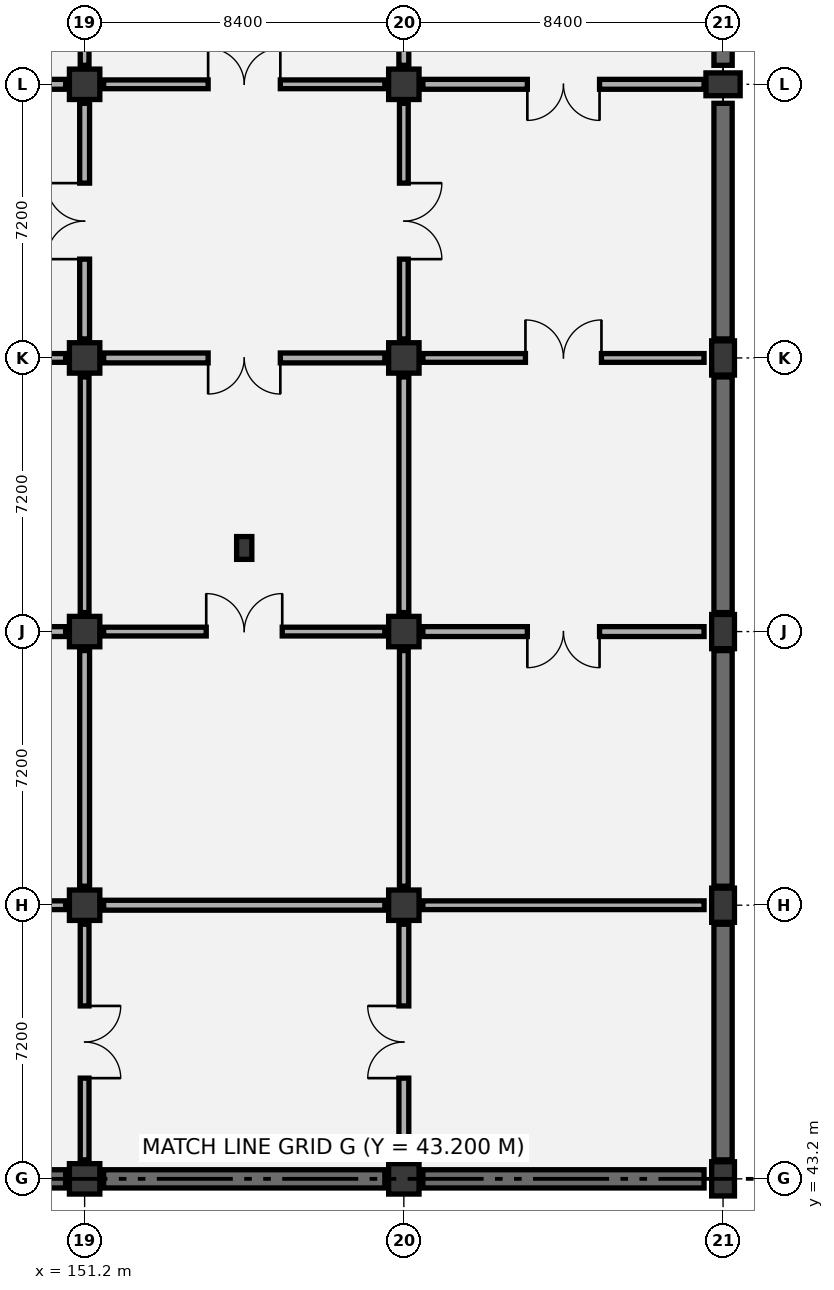
"""IFC4 building model, lengths in metres.
Left out: names, types, materials, properties, quantities, classifications, styles, units other than length and angle.
Written with IfcOpenShell. Run it as: python <this file> out.ifc"""

import sys

from ifc_helpers import new_model, si_unit, direction, frame, frame_2d, origin, origin_2d, place, context, subcontext, project, spatial, rectangle, extrude, element, fill, save


model = new_model("IFC4")
c1 = context("Model", 3, precision=1e-05, world=origin(), true_north=direction((0.0, 1.0)))
c2 = subcontext(c1, "Body", "Model", "MODEL_VIEW")
j1 = project(units=[si_unit("LENGTHUNIT", "METRE"), si_unit("PLANEANGLEUNIT", "RADIAN")], contexts=[c1])
p1 = place(None, origin())
s1 = spatial("IfcSite", under=j1, at=p1, CompositionType="ELEMENT")
p2 = place(p1, origin())
s2 = spatial("IfcBuilding", under=s1, at=p2, CompositionType="ELEMENT")
p3 = place(p2, frame((0.0, 0.0, -4.8)))
s3 = spatial("IfcBuildingStorey", under=s2, at=p3, CompositionType="ELEMENT", Elevation=-4.8)
for number, where, z_axis, x_axis in (
    (1, (151.2, 43.2, 0.0), (0.0, 0.0, 1.0), (1.0, 0.0, 0.0)),
    (2, (151.2, 50.4, 0.0), (0.0, 0.0, 1.0), (1.0, 0.0, 0.0)),
    (3, (151.2, 57.6, 0.0), (0.0, 0.0, 1.0), (1.0, 0.0, 0.0)),
    (4, (151.2, 64.8, 0.0), (0.0, 0.0, 1.0), (1.0, 0.0, 0.0)),
    (5, (151.2, 72.0, 0.0), (0.0, 0.0, 1.0), (1.0, 0.0, 0.0)),
    (6, (159.6, 43.2, 0.0), (0.0, 0.0, 1.0), (1.0, 0.0, 0.0)),
    (7, (159.6, 50.4, 0.0), (0.0, 0.0, 1.0), (1.0, 0.0, 0.0)),
    (8, (159.6, 57.6, 0.0), (0.0, 0.0, 1.0), (1.0, 0.0, 0.0)),
    (9, (159.6, 64.8, 0.0), (0.0, 0.0, 1.0), (1.0, 0.0, 0.0)),
    (10, (159.6, 72.0, 0.0), (0.0, 0.0, 1.0), (1.0, 0.0, 0.0)),
):
    element("IfcColumn", number, at=place(p3, frame(where, z_axis=z_axis, x_axis=x_axis)), inside=s3, PredefinedType="COLUMN", context=c2, shape_type="SweptSolid", body=[
        extrude(rectangle(XDim=0.8, YDim=0.8, at=origin_2d()), origin(), (0.0, 0.0, 1.0), 4.8),
    ])
for number, where, z_axis, x_axis in (
    (11, (168.0, 43.2, 0.0), (0.0, 0.0, 1.0), (1.0, 0.0, 0.0)),
    (12, (168.0, 50.4, 0.0), (0.0, 0.0, 1.0), (1.0, 0.0, 0.0)),
    (13, (168.0, 57.6, 0.0), (0.0, 0.0, 1.0), (1.0, 0.0, 0.0)),
    (14, (168.0, 64.8, 0.0), (0.0, 0.0, 1.0), (1.0, 0.0, 0.0)),
    (15, (168.0, 72.0, 0.0), (0.0, 0.0, 1.0), (0.0, 1.0, 0.0)),
):
    element("IfcColumn", number, at=place(p3, frame(where, z_axis=z_axis, x_axis=x_axis)), inside=s3, PredefinedType="COLUMN", context=c2, shape_type="SweptSolid", body=[
        extrude(rectangle(XDim=0.6, YDim=0.9, at=origin_2d()), origin(), (0.0, 0.0, 1.0), 4.8),
    ])
p4 = place(p3, frame((155.4, 59.8, 0.0), z_axis=(0.0, 0.0, 1.0), x_axis=(1.0, 0.0, 0.0)))
e16 = element("IfcColumn", 16, at=p4, inside=s3, PredefinedType="PILASTER", context=c2, shape_type="SweptSolid", body=[
    extrude(rectangle(XDim=0.4, YDim=0.6, at=origin_2d()), origin(), (0.0, 0.0, 1.0), 4.8),
])
p5 = place(p3, frame((143.3, 43.2, 0.0), z_axis=(0.0, 0.0, 1.0), x_axis=(1.0, 0.0, 0.0)))
e17 = element("IfcWall", 17, at=p5, inside=s3, PredefinedType="USERDEFINED", context=c2, shape_type="SweptSolid", body=[
    extrude(rectangle(XDim=7.4, YDim=0.48, at=frame_2d((3.7, 0.0))), origin(), (0.0, 0.0, 1.0), 4.45),
])
p6 = place(p3, frame((151.7, 43.2, 0.0), z_axis=(0.0, 0.0, 1.0), x_axis=(1.0, 0.0, 0.0)))
e18 = element("IfcWall", 18, at=p6, inside=s3, PredefinedType="USERDEFINED", context=c2, shape_type="SweptSolid", body=[
    extrude(rectangle(XDim=7.4, YDim=0.48, at=frame_2d((3.7, 0.0))), origin(), (0.0, 0.0, 1.0), 4.45),
])
p7 = place(p3, frame((160.1, 43.2, 0.0), z_axis=(0.0, 0.0, 1.0), x_axis=(1.0, 0.0, 0.0)))
e19 = element("IfcWall", 19, at=p7, inside=s3, PredefinedType="USERDEFINED", context=c2, shape_type="SweptSolid", body=[
    extrude(rectangle(XDim=7.4, YDim=0.48, at=frame_2d((3.7, 0.0))), origin(), (0.0, 0.0, 1.0), 4.575),
])
p8 = place(p3, frame((168.0, 43.7, 0.0), z_axis=(0.0, 0.0, 1.0), x_axis=(0.0, 1.0, 0.0)))
e20 = element("IfcWall", 20, at=p8, inside=s3, PredefinedType="USERDEFINED", context=c2, shape_type="SweptSolid", body=[
    extrude(rectangle(XDim=6.2, YDim=0.48, at=frame_2d((3.1, 0.0))), origin(), (0.0, 0.0, 1.0), 4.575),
])
p9 = place(p3, frame((168.0, 50.9, 0.0), z_axis=(0.0, 0.0, 1.0), x_axis=(0.0, 1.0, 0.0)))
e21 = element("IfcWall", 21, at=p9, inside=s3, PredefinedType="USERDEFINED", context=c2, shape_type="SweptSolid", body=[
    extrude(rectangle(XDim=6.2, YDim=0.48, at=frame_2d((3.1, 0.0))), origin(), (0.0, 0.0, 1.0), 4.575),
])
for number, where, z_axis, x_axis in (
    (22, (168.0, 58.1, 0.0), (0.0, 0.0, 1.0), (0.0, 1.0, 0.0)),
    (23, (168.0, 65.3, 0.0), (0.0, 0.0, 1.0), (0.0, 1.0, 0.0)),
    (24, (168.0, 72.5, 0.0), (0.0, 0.0, 1.0), (0.0, 1.0, 0.0)),
):
    element("IfcWall", number, at=place(p3, frame(where, z_axis=z_axis, x_axis=x_axis)), inside=s3, PredefinedType="USERDEFINED", context=c2, shape_type="SweptSolid", body=[
        extrude(rectangle(XDim=6.2, YDim=0.48, at=frame_2d((3.1, 0.0))), origin(), (0.0, 0.0, 1.0), 4.45),
    ])
p10 = place(p3, frame((151.2, 43.7, 0.0), z_axis=(0.0, 0.0, 1.0), x_axis=(0.0, 1.0, 0.0)))
e25 = element("IfcWall", 25, at=p10, inside=s3, PredefinedType="PARTITIONING", context=c2, shape_type="SweptSolid", body=[
    extrude(rectangle(XDim=6.2, YDim=0.23, at=frame_2d((3.1, 0.0))), origin(), (0.0, 0.0, 1.0), 3.645),
])
p11 = place(p10, frame((2.15, 0.0, 0.0)))
e26 = element("IfcOpeningElement", 26, at=p11, cuts=e25, PredefinedType="OPENING", context=c2, shape_type="SweptSolid", body=[
    extrude(rectangle(XDim=1.9, YDim=2.3, at=frame_2d((0.95, 1.15))), frame((0.0, 0.125, 0.0), z_axis=(0.0, -1.0, 0.0), x_axis=(1.0, 0.0, 0.0)), (0.0, 0.0, 1.0), 0.25),
])
p12 = place(p3, frame((143.3, 50.4, 0.0), z_axis=(0.0, 0.0, 1.0), x_axis=(1.0, 0.0, 0.0)))
e27 = element("IfcWall", 27, at=p12, inside=s3, PredefinedType="PARTITIONING", context=c2, shape_type="SweptSolid", body=[
    extrude(rectangle(XDim=7.4, YDim=0.23, at=frame_2d((3.7, 0.0))), origin(), (0.0, 0.0, 1.0), 3.545),
])
p13 = place(p3, frame((151.2, 50.9, 0.0), z_axis=(0.0, 0.0, 1.0), x_axis=(0.0, 1.0, 0.0)))
e28 = element("IfcWall", 28, at=p13, inside=s3, PredefinedType="PARTITIONING", context=c2, shape_type="SweptSolid", body=[
    extrude(rectangle(XDim=6.2, YDim=0.26, at=frame_2d((3.1, 0.0))), origin(), (0.0, 0.0, 1.0), 3.645),
])
p14 = place(p3, frame((143.3, 57.6, 0.0), z_axis=(0.0, 0.0, 1.0), x_axis=(1.0, 0.0, 0.0)))
e29 = element("IfcWall", 29, at=p14, inside=s3, PredefinedType="PARTITIONING", context=c2, shape_type="SweptSolid", body=[
    extrude(rectangle(XDim=7.4, YDim=0.26, at=frame_2d((3.7, 0.0))), origin(), (0.0, 0.0, 1.0), 3.545),
])
p15 = place(p14, frame((2.7, 0.0, 0.0)))
e30 = element("IfcOpeningElement", 30, at=p15, cuts=e29, PredefinedType="OPENING", context=c2, shape_type="SweptSolid", body=[
    extrude(rectangle(XDim=2.0, YDim=2.35, at=frame_2d((1.0, 1.175))), frame((0.0, 0.14, 0.0), z_axis=(0.0, -1.0, 0.0), x_axis=(1.0, 0.0, 0.0)), (0.0, 0.0, 1.0), 0.28),
])
p16 = place(p3, frame((151.2, 58.1, 0.0), z_axis=(0.0, 0.0, 1.0), x_axis=(0.0, 1.0, 0.0)))
e31 = element("IfcWall", 31, at=p16, inside=s3, PredefinedType="PARTITIONING", context=c2, shape_type="SweptSolid", body=[
    extrude(rectangle(XDim=6.2, YDim=0.23, at=frame_2d((3.1, 0.0))), origin(), (0.0, 0.0, 1.0), 3.645),
])
p17 = place(p3, frame((143.3, 64.8, 0.0), z_axis=(0.0, 0.0, 1.0), x_axis=(1.0, 0.0, 0.0)))
e32 = element("IfcWall", 32, at=p17, inside=s3, PredefinedType="PARTITIONING", context=c2, shape_type="SweptSolid", body=[
    extrude(rectangle(XDim=7.4, YDim=0.23, at=frame_2d((3.7, 0.0))), origin(), (0.0, 0.0, 1.0), 3.545),
])
p18 = place(p17, frame((2.75, 0.0, 0.0)))
e33 = element("IfcOpeningElement", 33, at=p18, cuts=e32, PredefinedType="OPENING", context=c2, shape_type="SweptSolid", body=[
    extrude(rectangle(XDim=1.9, YDim=2.3, at=frame_2d((0.95, 1.15))), frame((0.0, 0.125, 0.0), z_axis=(0.0, -1.0, 0.0), x_axis=(1.0, 0.0, 0.0)), (0.0, 0.0, 1.0), 0.25),
])
p19 = place(p3, frame((151.2, 65.3, 0.0), z_axis=(0.0, 0.0, 1.0), x_axis=(0.0, 1.0, 0.0)))
e34 = element("IfcWall", 34, at=p19, inside=s3, PredefinedType="PARTITIONING", context=c2, shape_type="SweptSolid", body=[
    extrude(rectangle(XDim=6.2, YDim=0.26, at=frame_2d((3.1, 0.0))), origin(), (0.0, 0.0, 1.0), 3.645),
])
p20 = place(p19, frame((2.1, 0.0, 0.0)))
e35 = element("IfcOpeningElement", 35, at=p20, cuts=e34, PredefinedType="OPENING", context=c2, shape_type="SweptSolid", body=[
    extrude(rectangle(XDim=2.0, YDim=2.35, at=frame_2d((1.0, 1.175))), frame((0.0, 0.14, 0.0), z_axis=(0.0, -1.0, 0.0), x_axis=(1.0, 0.0, 0.0)), (0.0, 0.0, 1.0), 0.28),
])
p21 = place(p3, frame((143.3, 72.0, 0.0), z_axis=(0.0, 0.0, 1.0), x_axis=(1.0, 0.0, 0.0)))
e36 = element("IfcWall", 36, at=p21, inside=s3, PredefinedType="PARTITIONING", context=c2, shape_type="SweptSolid", body=[
    extrude(rectangle(XDim=7.4, YDim=0.26, at=frame_2d((3.7, 0.0))), origin(), (0.0, 0.0, 1.0), 3.545),
])
p22 = place(p21, frame((2.75, 0.0, 0.0)))
e37 = element("IfcOpeningElement", 37, at=p22, cuts=e36, PredefinedType="OPENING", context=c2, shape_type="SweptSolid", body=[
    extrude(rectangle(XDim=1.9, YDim=2.3, at=frame_2d((0.95, 1.15))), frame((0.0, 0.14, 0.0), z_axis=(0.0, -1.0, 0.0), x_axis=(1.0, 0.0, 0.0)), (0.0, 0.0, 1.0), 0.28),
])
p23 = place(p3, frame((151.2, 72.5, 0.0), z_axis=(0.0, 0.0, 1.0), x_axis=(0.0, 1.0, 0.0)))
e38 = element("IfcWall", 38, at=p23, inside=s3, PredefinedType="PARTITIONING", context=c2, shape_type="SweptSolid", body=[
    extrude(rectangle(XDim=6.2, YDim=0.23, at=frame_2d((3.1, 0.0))), origin(), (0.0, 0.0, 1.0), 3.645),
])
p24 = place(p3, frame((159.6, 43.7, 0.0), z_axis=(0.0, 0.0, 1.0), x_axis=(0.0, 1.0, 0.0)))
e39 = element("IfcWall", 39, at=p24, inside=s3, PredefinedType="PARTITIONING", context=c2, shape_type="SweptSolid", body=[
    extrude(rectangle(XDim=6.2, YDim=0.26, at=frame_2d((3.1, 0.0))), origin(), (0.0, 0.0, 1.0), 3.645),
])
p25 = place(p24, frame((2.15, 0.0, 0.0)))
e40 = element("IfcOpeningElement", 40, at=p25, cuts=e39, PredefinedType="OPENING", context=c2, shape_type="SweptSolid", body=[
    extrude(rectangle(XDim=1.9, YDim=2.3, at=frame_2d((0.95, 1.15))), frame((0.0, 0.14, 0.0), z_axis=(0.0, -1.0, 0.0), x_axis=(1.0, 0.0, 0.0)), (0.0, 0.0, 1.0), 0.28),
])
p26 = place(p3, frame((151.7, 50.4, 0.0), z_axis=(0.0, 0.0, 1.0), x_axis=(1.0, 0.0, 0.0)))
e41 = element("IfcWall", 41, at=p26, inside=s3, PredefinedType="PARTITIONING", context=c2, shape_type="SweptSolid", body=[
    extrude(rectangle(XDim=7.4, YDim=0.26, at=frame_2d((3.7, 0.0))), origin(), (0.0, 0.0, 1.0), 3.545),
])
p27 = place(p3, frame((159.6, 50.9, 0.0), z_axis=(0.0, 0.0, 1.0), x_axis=(0.0, 1.0, 0.0)))
e42 = element("IfcWall", 42, at=p27, inside=s3, PredefinedType="PARTITIONING", context=c2, shape_type="SweptSolid", body=[
    extrude(rectangle(XDim=6.2, YDim=0.23, at=frame_2d((3.1, 0.0))), origin(), (0.0, 0.0, 1.0), 3.645),
])
p28 = place(p3, frame((151.7, 57.6, 0.0), z_axis=(0.0, 0.0, 1.0), x_axis=(1.0, 0.0, 0.0)))
e43 = element("IfcWall", 43, at=p28, inside=s3, PredefinedType="PARTITIONING", context=c2, shape_type="SweptSolid", body=[
    extrude(rectangle(XDim=7.4, YDim=0.23, at=frame_2d((3.7, 0.0))), origin(), (0.0, 0.0, 1.0), 3.545),
])
p29 = place(p28, frame((2.7, 0.0, 0.0)))
e44 = element("IfcOpeningElement", 44, at=p29, cuts=e43, PredefinedType="OPENING", context=c2, shape_type="SweptSolid", body=[
    extrude(rectangle(XDim=2.0, YDim=2.35, at=frame_2d((1.0, 1.175))), frame((0.0, 0.125, 0.0), z_axis=(0.0, -1.0, 0.0), x_axis=(1.0, 0.0, 0.0)), (0.0, 0.0, 1.0), 0.25),
])
p30 = place(p3, frame((159.6, 58.1, 0.0), z_axis=(0.0, 0.0, 1.0), x_axis=(0.0, 1.0, 0.0)))
e45 = element("IfcWall", 45, at=p30, inside=s3, PredefinedType="PARTITIONING", context=c2, shape_type="SweptSolid", body=[
    extrude(rectangle(XDim=6.2, YDim=0.26, at=frame_2d((3.1, 0.0))), origin(), (0.0, 0.0, 1.0), 3.645),
])
p31 = place(p3, frame((151.7, 64.8, 0.0), z_axis=(0.0, 0.0, 1.0), x_axis=(1.0, 0.0, 0.0)))
e46 = element("IfcWall", 46, at=p31, inside=s3, PredefinedType="PARTITIONING", context=c2, shape_type="SweptSolid", body=[
    extrude(rectangle(XDim=7.4, YDim=0.26, at=frame_2d((3.7, 0.0))), origin(), (0.0, 0.0, 1.0), 3.545),
])
p32 = place(p31, frame((2.75, 0.0, 0.0)))
e47 = element("IfcOpeningElement", 47, at=p32, cuts=e46, PredefinedType="OPENING", context=c2, shape_type="SweptSolid", body=[
    extrude(rectangle(XDim=1.9, YDim=2.3, at=frame_2d((0.95, 1.15))), frame((0.0, 0.14, 0.0), z_axis=(0.0, -1.0, 0.0), x_axis=(1.0, 0.0, 0.0)), (0.0, 0.0, 1.0), 0.28),
])
p33 = place(p3, frame((159.6, 65.3, 0.0), z_axis=(0.0, 0.0, 1.0), x_axis=(0.0, 1.0, 0.0)))
e48 = element("IfcWall", 48, at=p33, inside=s3, PredefinedType="PARTITIONING", context=c2, shape_type="SweptSolid", body=[
    extrude(rectangle(XDim=6.2, YDim=0.23, at=frame_2d((3.1, 0.0))), origin(), (0.0, 0.0, 1.0), 3.645),
])
p34 = place(p33, frame((2.1, 0.0, 0.0)))
e49 = element("IfcOpeningElement", 49, at=p34, cuts=e48, PredefinedType="OPENING", context=c2, shape_type="SweptSolid", body=[
    extrude(rectangle(XDim=2.0, YDim=2.35, at=frame_2d((1.0, 1.175))), frame((0.0, 0.125, 0.0), z_axis=(0.0, -1.0, 0.0), x_axis=(1.0, 0.0, 0.0)), (0.0, 0.0, 1.0), 0.25),
])
p35 = place(p3, frame((151.7, 72.0, 0.0), z_axis=(0.0, 0.0, 1.0), x_axis=(1.0, 0.0, 0.0)))
e50 = element("IfcWall", 50, at=p35, inside=s3, PredefinedType="PARTITIONING", context=c2, shape_type="SweptSolid", body=[
    extrude(rectangle(XDim=7.4, YDim=0.23, at=frame_2d((3.7, 0.0))), origin(), (0.0, 0.0, 1.0), 3.545),
])
p36 = place(p35, frame((2.75, 0.0, 0.0)))
e51 = element("IfcOpeningElement", 51, at=p36, cuts=e50, PredefinedType="OPENING", context=c2, shape_type="SweptSolid", body=[
    extrude(rectangle(XDim=1.9, YDim=2.3, at=frame_2d((0.95, 1.15))), frame((0.0, 0.125, 0.0), z_axis=(0.0, -1.0, 0.0), x_axis=(1.0, 0.0, 0.0)), (0.0, 0.0, 1.0), 0.25),
])
p37 = place(p3, frame((159.6, 72.5, 0.0), z_axis=(0.0, 0.0, 1.0), x_axis=(0.0, 1.0, 0.0)))
e52 = element("IfcWall", 52, at=p37, inside=s3, PredefinedType="PARTITIONING", context=c2, shape_type="SweptSolid", body=[
    extrude(rectangle(XDim=6.2, YDim=0.26, at=frame_2d((3.1, 0.0))), origin(), (0.0, 0.0, 1.0), 3.645),
])
p38 = place(p3, frame((160.1, 50.4, 0.0), z_axis=(0.0, 0.0, 1.0), x_axis=(1.0, 0.0, 0.0)))
e53 = element("IfcWall", 53, at=p38, inside=s3, PredefinedType="PARTITIONING", context=c2, shape_type="SweptSolid", body=[
    extrude(rectangle(XDim=7.4, YDim=0.23, at=frame_2d((3.7, 0.0))), origin(), (0.0, 0.0, 1.0), 3.67),
])
p39 = place(p3, frame((160.1, 57.6, 0.0), z_axis=(0.0, 0.0, 1.0), x_axis=(1.0, 0.0, 0.0)))
e54 = element("IfcWall", 54, at=p39, inside=s3, PredefinedType="PARTITIONING", context=c2, shape_type="SweptSolid", body=[
    extrude(rectangle(XDim=7.4, YDim=0.26, at=frame_2d((3.7, 0.0))), origin(), (0.0, 0.0, 1.0), 3.545),
])
p40 = place(p39, frame((2.75, 0.0, 0.0)))
e55 = element("IfcOpeningElement", 55, at=p40, cuts=e54, PredefinedType="OPENING", context=c2, shape_type="SweptSolid", body=[
    extrude(rectangle(XDim=1.9, YDim=2.3, at=frame_2d((0.95, 1.15))), frame((0.0, 0.14, 0.0), z_axis=(0.0, -1.0, 0.0), x_axis=(1.0, 0.0, 0.0)), (0.0, 0.0, 1.0), 0.28),
])
p41 = place(p3, frame((160.1, 64.8, 0.0), z_axis=(0.0, 0.0, 1.0), x_axis=(1.0, 0.0, 0.0)))
e56 = element("IfcWall", 56, at=p41, inside=s3, PredefinedType="PARTITIONING", context=c2, shape_type="SweptSolid", body=[
    extrude(rectangle(XDim=7.4, YDim=0.23, at=frame_2d((3.7, 0.0))), origin(), (0.0, 0.0, 1.0), 3.545),
])
p42 = place(p41, frame((2.7, 0.0, 0.0)))
e57 = element("IfcOpeningElement", 57, at=p42, cuts=e56, PredefinedType="OPENING", context=c2, shape_type="SweptSolid", body=[
    extrude(rectangle(XDim=2.0, YDim=2.35, at=frame_2d((1.0, 1.175))), frame((0.0, 0.125, 0.0), z_axis=(0.0, -1.0, 0.0), x_axis=(1.0, 0.0, 0.0)), (0.0, 0.0, 1.0), 0.25),
])
p43 = place(p3, frame((160.1, 72.0, 0.0), z_axis=(0.0, 0.0, 1.0), x_axis=(1.0, 0.0, 0.0)))
e58 = element("IfcWall", 58, at=p43, inside=s3, PredefinedType="PARTITIONING", context=c2, shape_type="SweptSolid", body=[
    extrude(rectangle(XDim=7.4, YDim=0.26, at=frame_2d((3.7, 0.0))), origin(), (0.0, 0.0, 1.0), 3.545),
])
p44 = place(p43, frame((2.75, 0.0, 0.0)))
e59 = element("IfcOpeningElement", 59, at=p44, cuts=e58, PredefinedType="OPENING", context=c2, shape_type="SweptSolid", body=[
    extrude(rectangle(XDim=1.9, YDim=2.3, at=frame_2d((0.95, 1.15))), frame((0.0, 0.14, 0.0), z_axis=(0.0, -1.0, 0.0), x_axis=(1.0, 0.0, 0.0)), (0.0, 0.0, 1.0), 0.28),
])
p45 = place(p11, frame((1.9, 0.0, 0.0), z_axis=(0.0, 0.0, 1.0), x_axis=(-1.0, 0.0, 0.0)))
e60 = element("IfcDoor", 60, at=p45, inside=s3, OperationType="DOUBLE_DOOR_SINGLE_SWING", PredefinedType="DOOR", context=c2, shape_type="SweptSolid", body=[
    extrude(rectangle(XDim=1.9, YDim=2.3, at=frame_2d((0.95, 1.15))), frame((0.0, 0.025, 0.0), z_axis=(0.0, -1.0, 0.0), x_axis=(1.0, 0.0, 0.0)), (0.0, 0.0, 1.0), 0.05),
])
fill(e26, e60)
p46 = place(p20, origin())
e61 = element("IfcDoor", 61, at=p46, inside=s3, OperationType="DOUBLE_DOOR_SINGLE_SWING", PredefinedType="DOOR", context=c2, shape_type="SweptSolid", body=[
    extrude(rectangle(XDim=2.0, YDim=2.35, at=frame_2d((1.0, 1.175))), frame((0.0, 0.025, 0.0), z_axis=(0.0, -1.0, 0.0), x_axis=(1.0, 0.0, 0.0)), (0.0, 0.0, 1.0), 0.05),
])
fill(e35, e61)
p47 = place(p25, origin())
e62 = element("IfcDoor", 62, at=p47, inside=s3, OperationType="DOUBLE_DOOR_SINGLE_SWING", PredefinedType="DOOR", context=c2, shape_type="SweptSolid", body=[
    extrude(rectangle(XDim=1.9, YDim=2.3, at=frame_2d((0.95, 1.15))), frame((0.0, 0.025, 0.0), z_axis=(0.0, -1.0, 0.0), x_axis=(1.0, 0.0, 0.0)), (0.0, 0.0, 1.0), 0.05),
])
fill(e40, e62)
p48 = place(p29, origin())
e63 = element("IfcDoor", 63, at=p48, inside=s3, OperationType="DOUBLE_DOOR_SINGLE_SWING", PredefinedType="DOOR", context=c2, shape_type="SweptSolid", body=[
    extrude(rectangle(XDim=2.0, YDim=2.35, at=frame_2d((1.0, 1.175))), frame((0.0, 0.025, 0.0), z_axis=(0.0, -1.0, 0.0), x_axis=(1.0, 0.0, 0.0)), (0.0, 0.0, 1.0), 0.05),
])
fill(e44, e63)
p49 = place(p32, frame((1.9, 0.0, 0.0), z_axis=(0.0, 0.0, 1.0), x_axis=(-1.0, 0.0, 0.0)))
e64 = element("IfcDoor", 64, at=p49, inside=s3, OperationType="DOUBLE_DOOR_SINGLE_SWING", PredefinedType="DOOR", context=c2, shape_type="SweptSolid", body=[
    extrude(rectangle(XDim=1.9, YDim=2.3, at=frame_2d((0.95, 1.15))), frame((0.0, 0.025, 0.0), z_axis=(0.0, -1.0, 0.0), x_axis=(1.0, 0.0, 0.0)), (0.0, 0.0, 1.0), 0.05),
])
fill(e47, e64)
p50 = place(p34, frame((2.0, 0.0, 0.0), z_axis=(0.0, 0.0, 1.0), x_axis=(-1.0, 0.0, 0.0)))
e65 = element("IfcDoor", 65, at=p50, inside=s3, OperationType="DOUBLE_DOOR_SINGLE_SWING", PredefinedType="DOOR", context=c2, shape_type="SweptSolid", body=[
    extrude(rectangle(XDim=2.0, YDim=2.35, at=frame_2d((1.0, 1.175))), frame((0.0, 0.025, 0.0), z_axis=(0.0, -1.0, 0.0), x_axis=(1.0, 0.0, 0.0)), (0.0, 0.0, 1.0), 0.05),
])
fill(e49, e65)
p51 = place(p36, origin())
e66 = element("IfcDoor", 66, at=p51, inside=s3, OperationType="DOUBLE_DOOR_SINGLE_SWING", PredefinedType="DOOR", context=c2, shape_type="SweptSolid", body=[
    extrude(rectangle(XDim=1.9, YDim=2.3, at=frame_2d((0.95, 1.15))), frame((0.0, 0.025, 0.0), z_axis=(0.0, -1.0, 0.0), x_axis=(1.0, 0.0, 0.0)), (0.0, 0.0, 1.0), 0.05),
])
fill(e51, e66)
p52 = place(p40, frame((1.9, 0.0, 0.0), z_axis=(0.0, 0.0, 1.0), x_axis=(-1.0, 0.0, 0.0)))
e67 = element("IfcDoor", 67, at=p52, inside=s3, OperationType="DOUBLE_DOOR_SINGLE_SWING", PredefinedType="DOOR", context=c2, shape_type="SweptSolid", body=[
    extrude(rectangle(XDim=1.9, YDim=2.3, at=frame_2d((0.95, 1.15))), frame((0.0, 0.025, 0.0), z_axis=(0.0, -1.0, 0.0), x_axis=(1.0, 0.0, 0.0)), (0.0, 0.0, 1.0), 0.05),
])
fill(e55, e67)
p53 = place(p42, origin())
e68 = element("IfcDoor", 68, at=p53, inside=s3, OperationType="DOUBLE_DOOR_SINGLE_SWING", PredefinedType="DOOR", context=c2, shape_type="SweptSolid", body=[
    extrude(rectangle(XDim=2.0, YDim=2.35, at=frame_2d((1.0, 1.175))), frame((0.0, 0.025, 0.0), z_axis=(0.0, -1.0, 0.0), x_axis=(1.0, 0.0, 0.0)), (0.0, 0.0, 1.0), 0.05),
])
fill(e57, e68)
p54 = place(p44, frame((1.9, 0.0, 0.0), z_axis=(0.0, 0.0, 1.0), x_axis=(-1.0, 0.0, 0.0)))
e69 = element("IfcDoor", 69, at=p54, inside=s3, OperationType="DOUBLE_DOOR_SINGLE_SWING", PredefinedType="DOOR", context=c2, shape_type="SweptSolid", body=[
    extrude(rectangle(XDim=1.9, YDim=2.3, at=frame_2d((0.95, 1.15))), frame((0.0, 0.025, 0.0), z_axis=(0.0, -1.0, 0.0), x_axis=(1.0, 0.0, 0.0)), (0.0, 0.0, 1.0), 0.05),
])
fill(e59, e69)
save(model, sys.argv[1])
